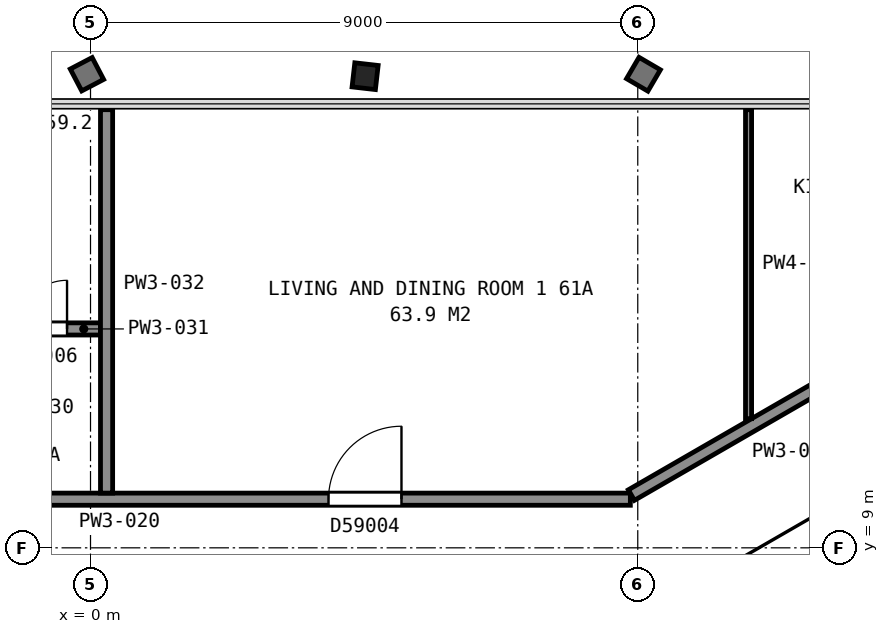
"""IFC4 building model, lengths in metres.
Left out: names, types, materials, properties, quantities, classifications, styles, units other than length and angle.
Written with IfcOpenShell. Run it as: python <this file> out.ifc"""

import sys

from ifc_helpers import new_model, si_unit, direction, frame, frame_2d, origin, origin_2d, place, context, subcontext, project, spatial, rectangle, i_section, extrude, element, fill, save


model = new_model("IFC4")
c1 = context("Model", 3, precision=1e-05, world=origin(), true_north=direction((0.0, 1.0)))
c2 = subcontext(c1, "Body", "Model", "MODEL_VIEW")
j1 = project(units=[si_unit("LENGTHUNIT", "METRE"), si_unit("PLANEANGLEUNIT", "RADIAN")], contexts=[c1])
p1 = place(None, origin())
s1 = spatial("IfcSite", under=j1, at=p1, CompositionType="ELEMENT")
p2 = place(p1, origin())
s2 = spatial("IfcBuilding", under=s1, at=p2, CompositionType="ELEMENT")
p3 = place(p2, frame((0.0, 0.0, 243.4)))
s3 = spatial("IfcBuildingStorey", under=s2, at=p3, CompositionType="ELEMENT", Elevation=243.4)
p4 = place(p3, frame((4.491, 16.537, 0.035), z_axis=(0.021208876796, 0.185858474847, 0.982347601856), x_axis=(0.99976630856, 0.000169989892, -0.021617108328)))
e1 = element("IfcColumn", 1, at=p4, inside=s3, PredefinedType="COLUMN", context=c2, shape_type="SweptSolid", body=[
    extrude(i_section(OverallWidth=0.399, OverallDepth=0.386, WebThickness=0.021, FlangeThickness=0.033, FilletRadius=0.015, at=origin_2d()), origin(), (0.0, 0.0, 1.0), 3.695),
])
p5 = place(p3, frame((6.178, 5.299, 0.0), z_axis=(0.0, 0.0, 1.0), x_axis=(0.866019993635, 0.500009370536, 0.0)))
e2 = element("IfcWall", 2, at=p5, inside=s3, PredefinedType="PARTITIONING", context=c2, shape_type="SweptSolid", body=[
    extrude(rectangle(XDim=9.6, YDim=0.2, at=frame_2d((4.8, 0.0))), origin(), (0.0, 0.0, 1.0), 3.45),
])
p6 = place(p3, frame((-8.878, 9.8, 0.0), z_axis=(0.0, 0.0, 1.0), x_axis=(1.0, 0.0, 0.0)))
e3 = element("IfcWall", 3, at=p6, inside=s3, PredefinedType="PARTITIONING", context=c2, shape_type="SweptSolid", body=[
    extrude(rectangle(XDim=17.756, YDim=0.2, at=frame_2d((8.878, 0.0))), origin(), (0.0, 0.0, 1.0), 2.713),
])
p7 = place(p6, frame((12.792, 0.0, 0.0)))
e4 = element("IfcOpeningElement", 4, at=p7, cuts=e3, PredefinedType="OPENING", context=c2, shape_type="SweptSolid", body=[
    extrude(rectangle(XDim=1.2, YDim=2.1, at=frame_2d((0.6, 1.05))), frame((0.0, 0.11, 0.0), z_axis=(0.0, -1.0, 0.0), x_axis=(1.0, 0.0, 0.0)), (0.0, 0.0, 1.0), 0.22),
])
p8 = place(p6, frame((5.013, 0.0, 0.0)))
e5 = element("IfcOpeningElement", 5, at=p8, cuts=e3, PredefinedType="OPENING", context=c2, shape_type="SweptSolid", body=[
    extrude(rectangle(XDim=0.9, YDim=2.1, at=frame_2d((0.45, 1.05))), frame((0.0, 0.11, 0.0), z_axis=(0.0, -1.0, 0.0), x_axis=(1.0, 0.0, 0.0)), (0.0, 0.0, 1.0), 0.22),
])
p9 = place(p6, frame((1.834, 0.0, 0.0)))
e6 = element("IfcOpeningElement", 6, at=p9, cuts=e3, PredefinedType="OPENING", context=c2, shape_type="SweptSolid", body=[
    extrude(rectangle(XDim=0.9, YDim=2.1, at=frame_2d((0.45, 1.05))), frame((0.0, 0.11, 0.0), z_axis=(0.0, -1.0, 0.0), x_axis=(1.0, 0.0, 0.0)), (0.0, 0.0, 1.0), 0.22),
])
p10 = place(p3, frame((0.164, 12.6, 0.0), z_axis=(0.0, 0.0, 1.0), x_axis=(-1.0, 0.0, 0.0)))
e7 = element("IfcWall", 7, at=p10, inside=s3, PredefinedType="PARTITIONING", context=c2, shape_type="SweptSolid", body=[
    extrude(rectangle(XDim=1.9, YDim=0.2, at=frame_2d((0.95, 0.0))), origin(), (0.0, 0.0, 1.0), 2.713),
])
p11 = place(p10, frame((0.55, 0.0, 0.0)))
e8 = element("IfcOpeningElement", 8, at=p11, cuts=e7, PredefinedType="OPENING", context=c2, shape_type="SweptSolid", body=[
    extrude(rectangle(XDim=0.8, YDim=2.1, at=frame_2d((0.4, 1.05))), frame((0.0, 0.11, 0.0), z_axis=(0.0, -1.0, 0.0), x_axis=(1.0, 0.0, 0.0)), (0.0, 0.0, 1.0), 0.22),
])
p12 = place(p3, frame((0.264, 9.9, 0.0), z_axis=(0.0, 0.0, 1.0), x_axis=(0.0, 1.0, 0.0)))
e9 = element("IfcWall", 9, at=p12, inside=s3, PredefinedType="PARTITIONING", context=c2, shape_type="SweptSolid", body=[
    extrude(rectangle(XDim=6.306, YDim=0.2, at=frame_2d((3.153, 0.0))), origin(), (0.0, 0.0, 1.0), 2.713),
])
p13 = place(p3, frame((8.895, 9.867, 0.0), z_axis=(0.0, 0.0, 1.0), x_axis=(0.866081499088, 0.499902827495, 0.0)))
e10 = element("IfcWall", 10, at=p13, inside=s3, PredefinedType="PARTITIONING", context=c2, shape_type="SweptSolid", body=[
    extrude(rectangle(XDim=8.163, YDim=0.2, at=frame_2d((4.081, 0.0))), origin(), (0.0, 0.0, 1.0), 2.713),
])
p14 = place(p13, frame((4.525, 0.0, 0.0)))
e11 = element("IfcOpeningElement", 11, at=p14, cuts=e10, PredefinedType="OPENING", context=c2, shape_type="SweptSolid", body=[
    extrude(rectangle(XDim=0.9, YDim=2.1, at=frame_2d((0.45, 1.05))), frame((0.0, 0.11, 0.0), z_axis=(0.0, -1.0, 0.0), x_axis=(1.0, 0.0, 0.0)), (0.0, 0.0, 1.0), 0.22),
])
p15 = place(p3, frame((10.822, 11.124, 0.0), z_axis=(0.0, 0.0, 1.0), x_axis=(0.0, 1.0, 0.0)))
e12 = element("IfcWall", 12, at=p15, inside=s3, PredefinedType="PARTITIONING", context=c2, shape_type="SweptSolid", body=[
    extrude(rectangle(XDim=5.082, YDim=0.1, at=frame_2d((2.541, 0.0))), origin(), (0.0, 0.0, 1.0), 2.713),
])
p16 = place(p7, origin())
e13 = element("IfcDoor", 13, at=p16, inside=s3, OperationType="SINGLE_SWING_RIGHT", PredefinedType="DOOR", context=c2, shape_type="SweptSolid", body=[
    extrude(rectangle(XDim=1.2, YDim=2.1, at=frame_2d((0.6, 1.05))), frame((0.0, 0.025, 0.0), z_axis=(0.0, -1.0, 0.0), x_axis=(1.0, 0.0, 0.0)), (0.0, 0.0, 1.0), 0.05),
])
fill(e4, e13)
p17 = place(p11, origin())
e14 = element("IfcDoor", 14, at=p17, inside=s3, OperationType="SINGLE_SWING_LEFT", PredefinedType="DOOR", context=c2, shape_type="SweptSolid", body=[
    extrude(rectangle(XDim=0.8, YDim=2.1, at=frame_2d((0.4, 1.05))), frame((0.0, 0.025, 0.0), z_axis=(0.0, -1.0, 0.0), x_axis=(1.0, 0.0, 0.0)), (0.0, 0.0, 1.0), 0.05),
])
fill(e8, e14)
save(model, sys.argv[1])
